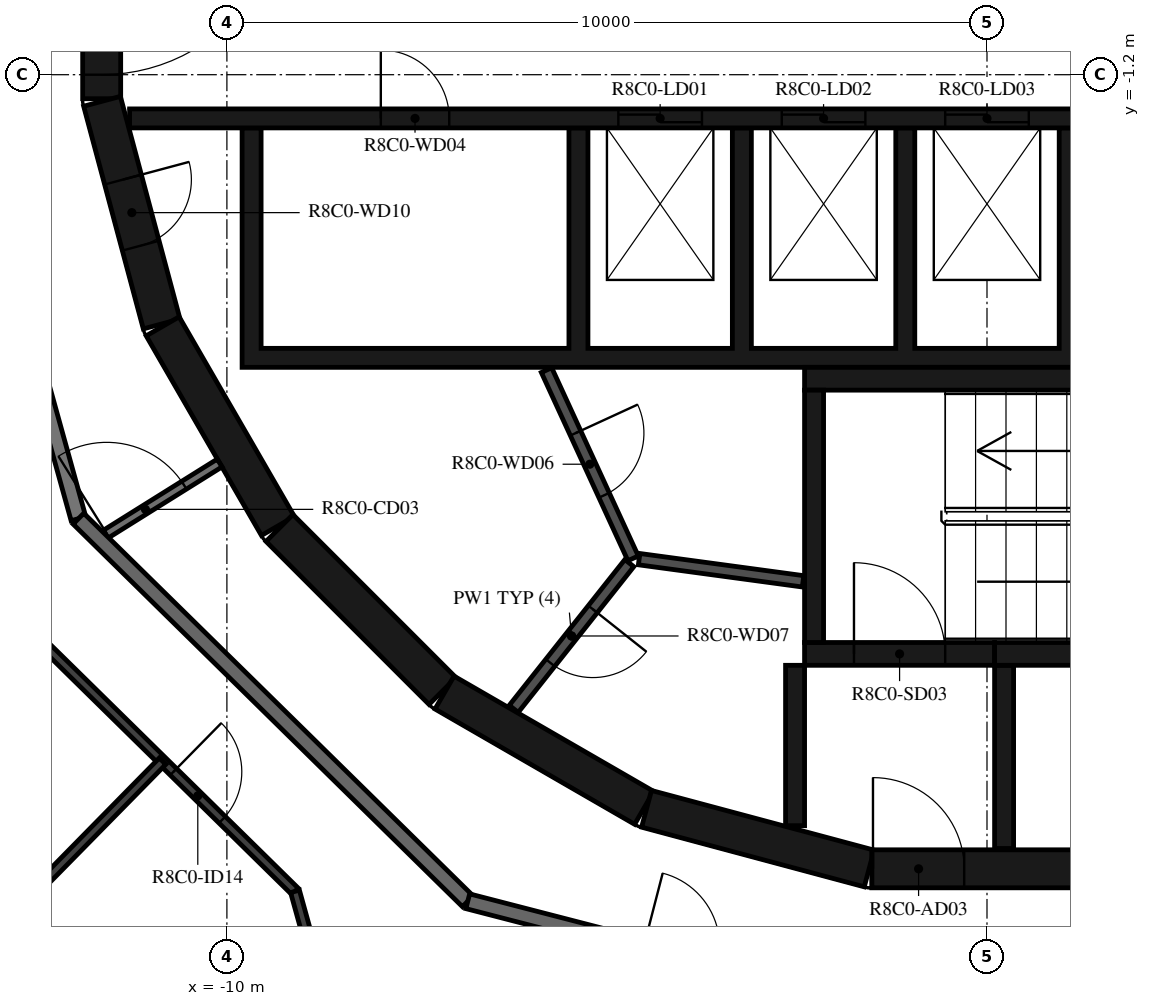
"""IFC4 building model, lengths in metres.
Left out: names, types, materials, properties, quantities, classifications, styles, units other than length and angle.
Written with IfcOpenShell. Run it as: python <this file> out.ifc"""

import sys

from ifc_helpers import new_model, si_unit, direction, frame, frame_2d, origin, place, context, subcontext, project, spatial, polyline, rectangle, outline, extrude, element, fill, save


model = new_model("IFC4")
c1 = context("Model", 3, precision=1e-05, world=origin(), true_north=direction((0.0, 1.0)))
c2 = subcontext(c1, "Body", "Model", "MODEL_VIEW")
j1 = project(units=[si_unit("LENGTHUNIT", "METRE"), si_unit("PLANEANGLEUNIT", "RADIAN")], contexts=[c1])
p1 = place(None, origin())
s1 = spatial("IfcSite", under=j1, at=p1, CompositionType="ELEMENT")
p2 = place(p1, origin())
s2 = spatial("IfcBuilding", under=s1, at=p2, CompositionType="ELEMENT")
p3 = place(p2, frame((0.0, 0.0, 319.2)))
s3 = spatial("IfcBuildingStorey", under=s2, at=p3, CompositionType="ELEMENT", Elevation=319.2)
p4 = place(p3, frame((-11.647, 1.516, 0.0), z_axis=(0.0, 0.0, 1.0), x_axis=(0.0, -1.0, 0.0)))
e1 = element("IfcWall", 1, at=p4, inside=s3, PredefinedType="SHEAR", context=c2, shape_type="SweptSolid", body=[
    extrude(rectangle(XDim=3.033, YDim=0.5, at=frame_2d((1.516, 0.0))), origin(), (0.0, 0.0, 1.0), 3.12),
])
p5 = place(p4, frame((0.316, 0.0, 0.0)))
e2 = element("IfcOpeningElement", 2, at=p5, cuts=e1, PredefinedType="OPENING", context=c2, shape_type="SweptSolid", body=[
    extrude(rectangle(XDim=2.4, YDim=2.1, at=frame_2d((1.2, 1.05))), frame((0.0, 0.26, 0.0), z_axis=(0.0, -1.0, 0.0), x_axis=(1.0, 0.0, 0.0)), (0.0, 0.0, 1.0), 0.52),
])
p6 = place(p3, frame((-11.643, -1.55, 0.0), z_axis=(0.0, 0.0, 1.0), x_axis=(0.258734743916, -0.965948410781, 0.0)))
e3 = element("IfcWall", 3, at=p6, inside=s3, PredefinedType="SHEAR", context=c2, shape_type="SweptSolid", body=[
    extrude(rectangle(XDim=3.033, YDim=0.5, at=frame_2d((1.516, 0.0))), origin(), (0.0, 0.0, 1.0), 3.12),
])
p7 = place(p6, frame((1.066, 0.0, 0.0)))
e4 = element("IfcOpeningElement", 4, at=p7, cuts=e3, PredefinedType="OPENING", context=c2, shape_type="SweptSolid", body=[
    extrude(rectangle(XDim=0.9, YDim=2.1, at=frame_2d((0.45, 1.05))), frame((0.0, 0.26, 0.0), z_axis=(0.0, -1.0, 0.0), x_axis=(1.0, 0.0, 0.0)), (0.0, 0.0, 1.0), 0.52),
])
p8 = place(p3, frame((-10.845, -4.51, 0.0), z_axis=(0.0, 0.0, 1.0), x_axis=(0.500087131594, -0.865975092491, 0.0)))
e5 = element("IfcWall", 5, at=p8, inside=s3, PredefinedType="SHEAR", context=c2, shape_type="SweptSolid", body=[
    extrude(rectangle(XDim=3.033, YDim=0.5, at=frame_2d((1.516, 0.0))), origin(), (0.0, 0.0, 1.0), 3.12),
])
p9 = place(p3, frame((-9.308, -7.164, 0.0), z_axis=(0.0, 0.0, 1.0), x_axis=(0.707106781187, -0.707106781187, 0.0)))
e6 = element("IfcWall", 6, at=p9, inside=s3, PredefinedType="SHEAR", context=c2, shape_type="SweptSolid", body=[
    extrude(rectangle(XDim=3.032, YDim=0.5, at=frame_2d((1.516, 0.0))), origin(), (0.0, 0.0, 1.0), 3.12),
])
for number, where, z_axis, x_axis in (
    (7, (-7.137, -9.329, 0.0), (0.0, 0.0, 1.0), (0.866, -0.5, 0.0)),
    (8, (-4.479, -10.858, 0.0), (0.0, 0.0, 1.0), (0.966, -0.259, 0.0)),
):
    element("IfcWall", number, at=place(p3, frame(where, z_axis=z_axis, x_axis=x_axis)), inside=s3, PredefinedType="SHEAR", context=c2, shape_type="SweptSolid", body=[
        extrude(rectangle(XDim=3.033, YDim=0.5, at=frame_2d((1.516, 0.0))), origin(), (0.0, 0.0, 1.0), 3.12),
    ])
p10 = place(p3, frame((-1.516, -11.647, 0.0), z_axis=(0.0, 0.0, 1.0), x_axis=(1.0, 0.0, 0.0)))
e9 = element("IfcWall", 9, at=p10, inside=s3, PredefinedType="SHEAR", context=c2, shape_type="SweptSolid", body=[
    extrude(rectangle(XDim=3.033, YDim=0.5, at=frame_2d((1.516, 0.0))), origin(), (0.0, 0.0, 1.0), 3.12),
])
p11 = place(p10, frame((0.016, 0.0, 0.0)))
e10 = element("IfcOpeningElement", 10, at=p11, cuts=e9, PredefinedType="OPENING", context=c2, shape_type="SweptSolid", body=[
    extrude(rectangle(XDim=1.2, YDim=2.1, at=frame_2d((0.6, 1.05))), frame((0.0, 0.26, 0.0), z_axis=(0.0, -1.0, 0.0), x_axis=(1.0, 0.0, 0.0)), (0.0, 0.0, 1.0), 0.52),
])
p12 = place(p3, frame((-2.275, -8.67, 0.0), z_axis=(0.0, 0.0, 1.0), x_axis=(0.0, 1.0, 0.0)))
e11 = element("IfcWall", 11, at=p12, inside=s3, PredefinedType="SHEAR", context=c2, shape_type="SweptSolid", body=[
    extrude(rectangle(XDim=3.32, YDim=0.25, at=frame_2d((1.66, 0.0))), origin(), (0.0, 0.0, 1.0), 3.12),
])
p13 = place(p3, frame((-2.4, -5.2, 0.0), z_axis=(0.0, 0.0, 1.0), x_axis=(1.0, 0.0, 0.0)))
e12 = element("IfcWall", 12, at=p13, inside=s3, PredefinedType="SHEAR", context=c2, shape_type="SweptSolid", body=[
    extrude(rectangle(XDim=7.05, YDim=0.3, at=frame_2d((3.525, 0.0))), origin(), (0.0, 0.0, 1.0), 3.12),
])
p14 = place(p3, frame((0.1, -8.82, 0.0), z_axis=(0.0, 0.0, 1.0), x_axis=(1.0, 0.0, 0.0)))
e13 = element("IfcWall", 13, at=p14, inside=s3, PredefinedType="SHEAR", context=c2, shape_type="SweptSolid", body=[
    extrude(rectangle(XDim=4.55, YDim=0.3, at=frame_2d((2.275, 0.0))), origin(), (0.0, 0.0, 1.0), 3.12),
])
p15 = place(p3, frame((-2.4, -8.82, 0.0), z_axis=(0.0, 0.0, 1.0), x_axis=(1.0, 0.0, 0.0)))
e14 = element("IfcWall", 14, at=p15, inside=s3, PredefinedType="SHEAR", context=c2, shape_type="SweptSolid", body=[
    extrude(rectangle(XDim=2.5, YDim=0.3, at=frame_2d((1.25, 0.0))), origin(), (0.0, 0.0, 1.0), 3.12),
])
p16 = place(p15, frame((0.65, 0.0, 0.0)))
e15 = element("IfcOpeningElement", 15, at=p16, cuts=e14, PredefinedType="OPENING", context=c2, shape_type="SweptSolid", body=[
    extrude(rectangle(XDim=1.2, YDim=2.1, at=frame_2d((0.6, 1.05))), frame((0.0, 0.16, 0.0), z_axis=(0.0, -1.0, 0.0), x_axis=(1.0, 0.0, 0.0)), (0.0, 0.0, 1.0), 0.32),
])
p17 = place(p3, frame((-2.525, -8.97, 0.0), z_axis=(0.0, 0.0, 1.0), x_axis=(0.0, -1.0, 0.0)))
e16 = element("IfcWall", 16, at=p17, inside=s3, PredefinedType="SHEAR", context=c2, shape_type="SweptSolid", body=[
    extrude(rectangle(XDim=2.11, YDim=0.25, at=frame_2d((1.055, 0.0))), origin(), (0.0, 0.0, 1.0), 3.12),
])
p18 = place(p3, frame((0.225, -8.97, 0.0), z_axis=(0.0, 0.0, 1.0), x_axis=(0.0, -1.0, 0.0)))
e17 = element("IfcWall", 17, at=p18, inside=s3, PredefinedType="SHEAR", context=c2, shape_type="SweptSolid", body=[
    extrude(rectangle(XDim=2.41, YDim=0.25, at=frame_2d((1.205, 0.0))), origin(), (0.0, 0.0, 1.0), 3.12),
])
p19 = place(p3, origin())
e18 = element("IfcWall", 18, at=p19, inside=s3, PredefinedType="SHEAR", context=c2, shape_type="SweptSolid", body=[
    extrude(outline(polyline([(9.8, -5.05), (9.8, -4.8), (9.8, -1.9), (9.55, -1.9), (9.55, -4.8), (7.65, -4.8), (7.65, -1.9), (7.4, -1.9), (7.4, -4.8), (5.5, -4.8), (5.5, -1.9), (5.25, -1.9), (5.25, -4.8), (3.35, -4.8), (3.35, -1.9), (3.1, -1.9), (3.1, -4.8), (1.2, -4.8), (1.2, -1.9), (0.95, -1.9), (0.95, -4.8), (-0.95, -4.8), (-0.95, -1.9), (-1.2, -1.9), (-1.2, -4.8), (-3.1, -4.8), (-3.1, -1.9), (-3.35, -1.9), (-3.35, -4.8), (-5.25, -4.8), (-5.25, -1.9), (-5.5, -1.9), (-5.5, -4.8), (-9.55, -4.8), (-9.55, -1.9), (-9.8, -1.9), (-9.8, -4.8), (-9.8, -5.05), (9.8, -5.05)])), origin(), (0.0, 0.0, 1.0), 3.12),
])
p20 = place(p3, frame((-11.28, -1.775, 0.0), z_axis=(0.0, 0.0, 1.0), x_axis=(1.0, 0.0, 0.0)))
e19 = element("IfcWall", 19, at=p20, inside=s3, PredefinedType="SHEAR", context=c2, shape_type="SweptSolid", body=[
    extrude(rectangle(XDim=14.38, YDim=0.25, at=frame_2d((7.19, 0.0))), origin(), (0.0, 0.0, 1.0), 3.12),
])
p21 = place(p20, frame((6.43, 0.0, 0.0)))
e20 = element("IfcOpeningElement", 20, at=p21, cuts=e19, PredefinedType="OPENING", context=c2, shape_type="SweptSolid", body=[
    extrude(rectangle(XDim=1.1, YDim=2.1, at=frame_2d((0.55, 1.05))), frame((0.0, 0.135, 0.0), z_axis=(0.0, -1.0, 0.0), x_axis=(1.0, 0.0, 0.0)), (0.0, 0.0, 1.0), 0.27),
])
p22 = place(p20, frame((8.58, 0.0, 0.0)))
e21 = element("IfcOpeningElement", 21, at=p22, cuts=e19, PredefinedType="OPENING", context=c2, shape_type="SweptSolid", body=[
    extrude(rectangle(XDim=1.1, YDim=2.1, at=frame_2d((0.55, 1.05))), frame((0.0, 0.135, 0.0), z_axis=(0.0, -1.0, 0.0), x_axis=(1.0, 0.0, 0.0)), (0.0, 0.0, 1.0), 0.27),
])
p23 = place(p20, frame((10.73, 0.0, 0.0)))
e22 = element("IfcOpeningElement", 22, at=p23, cuts=e19, PredefinedType="OPENING", context=c2, shape_type="SweptSolid", body=[
    extrude(rectangle(XDim=1.1, YDim=2.1, at=frame_2d((0.55, 1.05))), frame((0.0, 0.135, 0.0), z_axis=(0.0, -1.0, 0.0), x_axis=(1.0, 0.0, 0.0)), (0.0, 0.0, 1.0), 0.27),
])
p24 = place(p20, frame((3.305, 0.0, 0.0)))
e23 = element("IfcOpeningElement", 23, at=p24, cuts=e19, PredefinedType="OPENING", context=c2, shape_type="SweptSolid", body=[
    extrude(rectangle(XDim=0.9, YDim=2.1, at=frame_2d((0.45, 1.05))), frame((0.0, 0.135, 0.0), z_axis=(0.0, -1.0, 0.0), x_axis=(1.0, 0.0, 0.0)), (0.0, 0.0, 1.0), 0.27),
])
p25 = place(p20, frame((12.98, 0.0, 0.0)))
e24 = element("IfcOpeningElement", 24, at=p25, cuts=e19, PredefinedType="OPENING", context=c2, shape_type="SweptSolid", body=[
    extrude(rectangle(XDim=0.9, YDim=2.1, at=frame_2d((0.45, 1.05))), frame((0.0, 0.135, 0.0), z_axis=(0.0, -1.0, 0.0), x_axis=(1.0, 0.0, 0.0)), (0.0, 0.0, 1.0), 0.27),
])
p26 = place(p3, frame((-5.795, -5.086, 0.0), z_axis=(0.0, 0.0, 1.0), x_axis=(0.417887867606, -0.908498613157, 0.0)))
e25 = element("IfcWall", 25, at=p26, inside=s3, PredefinedType="PARTITIONING", context=c2, shape_type="SweptSolid", body=[
    extrude(rectangle(XDim=2.726, YDim=0.15, at=frame_2d((1.363, 0.0))), origin(), (0.0, 0.0, 1.0), 3.12),
])
p27 = place(p26, frame((0.913, 0.0, 0.0)))
e26 = element("IfcOpeningElement", 26, at=p27, cuts=e25, PredefinedType="OPENING", context=c2, shape_type="SweptSolid", body=[
    extrude(rectangle(XDim=0.9, YDim=2.1, at=frame_2d((0.45, 1.05))), frame((0.0, 0.085, 0.0), z_axis=(0.0, -1.0, 0.0), x_axis=(1.0, 0.0, 0.0)), (0.0, 0.0, 1.0), 0.17),
])
p28 = place(p3, frame((-4.706, -7.625, 0.0), z_axis=(0.0, 0.0, 1.0), x_axis=(-0.621392599334, -0.783499353856, 0.0)))
e27 = element("IfcWall", 27, at=p28, inside=s3, PredefinedType="PARTITIONING", context=c2, shape_type="SweptSolid", body=[
    extrude(rectangle(XDim=2.447, YDim=0.15, at=frame_2d((1.224, 0.0))), origin(), (0.0, 0.0, 1.0), 3.12),
])
p29 = place(p28, frame((0.774, 0.0, 0.0)))
e28 = element("IfcOpeningElement", 28, at=p29, cuts=e27, PredefinedType="OPENING", context=c2, shape_type="SweptSolid", body=[
    extrude(rectangle(XDim=0.9, YDim=2.1, at=frame_2d((0.45, 1.05))), frame((0.0, 0.085, 0.0), z_axis=(0.0, -1.0, 0.0), x_axis=(1.0, 0.0, 0.0)), (0.0, 0.0, 1.0), 0.17),
])
p30 = place(p3, frame((-2.42, -7.865, 0.0), z_axis=(0.0, 0.0, 1.0), x_axis=(-0.990972299108, 0.134066783362, 0.0)))
e29 = element("IfcWall", 29, at=p30, inside=s3, PredefinedType="PARTITIONING", context=c2, shape_type="SweptSolid", body=[
    extrude(rectangle(XDim=2.176, YDim=0.15, at=frame_2d((1.088, 0.0))), origin(), (0.0, 0.0, 1.0), 3.12),
])
p31 = place(p3, frame((-11.687, -7.303, 0.0), z_axis=(0.0, 0.0, 1.0), x_axis=(0.848064094072, 0.529893661357, 0.0)))
e30 = element("IfcWall", 30, at=p31, inside=s3, PredefinedType="PARTITIONING", context=c2, shape_type="SweptSolid", body=[
    extrude(rectangle(XDim=1.876, YDim=0.12, at=frame_2d((0.938, 0.0))), origin(), (0.0, 0.0, 1.0), 3.12),
])
p32 = place(p31, frame((0.125, 0.0, 0.0)))
e31 = element("IfcOpeningElement", 31, at=p32, cuts=e30, PredefinedType="OPENING", context=c2, shape_type="SweptSolid", body=[
    extrude(rectangle(XDim=1.2, YDim=2.1, at=frame_2d((0.6, 1.05))), frame((0.0, 0.07, 0.0), z_axis=(0.0, -1.0, 0.0), x_axis=(1.0, 0.0, 0.0)), (0.0, 0.0, 1.0), 0.14),
])
p33 = place(p3, frame((-13.872, -0.121, 0.0), z_axis=(0.0, 0.0, 1.0), x_axis=(0.267254575108, -0.963625960674, 0.0)))
e32 = element("IfcWall", 32, at=p33, inside=s3, PredefinedType="STANDARD", context=c2, shape_type="SweptSolid", body=[
    extrude(rectangle(XDim=7.181, YDim=0.2, at=frame_2d((3.591, 0.0))), origin(), (0.0, 0.0, 1.0), 3.12),
])
p34 = place(p3, frame((-11.953, -7.041, 0.0), z_axis=(0.0, 0.0, 1.0), x_axis=(0.713250549143, -0.70090916255, 0.0)))
e33 = element("IfcWall", 33, at=p34, inside=s3, PredefinedType="STANDARD", context=c2, shape_type="SweptSolid", body=[
    extrude(rectangle(XDim=7.181, YDim=0.2, at=frame_2d((3.59, 0.0))), origin(), (0.0, 0.0, 1.0), 3.12),
])
p35 = place(p3, frame((-6.831, -12.074, 0.0), z_axis=(0.0, 0.0, 1.0), x_axis=(0.968144780225, -0.250391063186, 0.0)))
e34 = element("IfcWall", 34, at=p35, inside=s3, PredefinedType="STANDARD", context=c2, shape_type="SweptSolid", body=[
    extrude(rectangle(XDim=7.181, YDim=0.2, at=frame_2d((3.591, 0.0))), origin(), (0.0, 0.0, 1.0), 3.12),
])
p36 = place(p35, frame((2.39, 0.0, 0.0)))
e35 = element("IfcOpeningElement", 35, at=p36, cuts=e34, PredefinedType="OPENING", context=c2, shape_type="SweptSolid", body=[
    extrude(rectangle(XDim=1.0, YDim=2.1, at=frame_2d((0.5, 1.05))), frame((0.0, 0.11, 0.0), z_axis=(0.0, -1.0, 0.0), x_axis=(1.0, 0.0, 0.0)), (0.0, 0.0, 1.0), 0.22),
])
p37 = place(p35, frame((5.69, 0.0, 0.0)))
e36 = element("IfcOpeningElement", 36, at=p37, cuts=e34, PredefinedType="OPENING", context=c2, shape_type="SweptSolid", body=[
    extrude(rectangle(XDim=1.0, YDim=2.1, at=frame_2d((0.5, 1.05))), frame((0.0, 0.11, 0.0), z_axis=(0.0, -1.0, 0.0), x_axis=(1.0, 0.0, 0.0)), (0.0, 0.0, 1.0), 0.22),
])
p38 = place(p3, frame((0.121, -13.872, 0.0), z_axis=(0.0, 0.0, 1.0), x_axis=(0.963625960674, 0.267254575108, 0.0)))
e37 = element("IfcWall", 37, at=p38, inside=s3, PredefinedType="STANDARD", context=c2, shape_type="SweptSolid", body=[
    extrude(rectangle(XDim=7.181, YDim=0.2, at=frame_2d((3.591, 0.0))), origin(), (0.0, 0.0, 1.0), 3.12),
])
p39 = place(p3, frame((-13.291, -7.829, 0.0), z_axis=(0.0, 0.0, 1.0), x_axis=(0.713255094589, -0.700904537039, 0.0)))
e38 = element("IfcWall", 38, at=p39, inside=s3, PredefinedType="PARTITIONING", context=c2, shape_type="SweptSolid", body=[
    extrude(rectangle(XDim=5.871, YDim=0.12, at=frame_2d((2.936, 0.0))), origin(), (0.0, 0.0, 1.0), 3.12),
])
p40 = place(p39, frame((3.627, 0.0, 0.0)))
e39 = element("IfcOpeningElement", 39, at=p40, cuts=e38, PredefinedType="OPENING", context=c2, shape_type="SweptSolid", body=[
    extrude(rectangle(XDim=0.9, YDim=2.1, at=frame_2d((0.45, 1.05))), frame((0.0, 0.07, 0.0), z_axis=(0.0, -1.0, 0.0), x_axis=(1.0, 0.0, 0.0)), (0.0, 0.0, 1.0), 0.14),
])
p41 = place(p3, frame((-9.104, -11.944, 0.0), z_axis=(0.0, 0.0, 1.0), x_axis=(0.267317596771, -0.963608479859, 0.0)))
e40 = element("IfcWall", 40, at=p41, inside=s3, PredefinedType="PARTITIONING", context=c2, shape_type="SweptSolid", body=[
    extrude(rectangle(XDim=1.042, YDim=0.12, at=frame_2d((0.521, 0.0))), origin(), (0.0, 0.0, 1.0), 3.12),
])
p42 = place(p3, frame((-14.066, -13.508, 0.0), z_axis=(0.0, 0.0, 1.0), x_axis=(0.700941781432, 0.7132184932, 0.0)))
e41 = element("IfcWall", 41, at=p42, inside=s3, PredefinedType="PARTITIONING", context=c2, shape_type="SweptSolid", body=[
    extrude(rectangle(XDim=4.594, YDim=0.12, at=frame_2d((2.297, 0.0))), origin(), (0.0, 0.0, 1.0), 3.12),
])
p43 = place(p16, origin())
e42 = element("IfcDoor", 42, at=p43, inside=s3, OperationType="SINGLE_SWING_LEFT", PredefinedType="DOOR", context=c2, shape_type="SweptSolid", body=[
    extrude(rectangle(XDim=1.2, YDim=2.1, at=frame_2d((0.6, 1.05))), frame((0.0, 0.025, 0.0), z_axis=(0.0, -1.0, 0.0), x_axis=(1.0, 0.0, 0.0)), (0.0, 0.0, 1.0), 0.05),
])
fill(e15, e42)
p44 = place(p11, origin())
e43 = element("IfcDoor", 43, at=p44, inside=s3, OperationType="SINGLE_SWING_RIGHT", PredefinedType="DOOR", context=c2, shape_type="SweptSolid", body=[
    extrude(rectangle(XDim=1.2, YDim=2.1, at=frame_2d((0.6, 1.05))), frame((0.0, 0.025, 0.0), z_axis=(0.0, -1.0, 0.0), x_axis=(1.0, 0.0, 0.0)), (0.0, 0.0, 1.0), 0.05),
])
fill(e10, e43)
p45 = place(p5, origin())
e44 = element("IfcDoor", 44, at=p45, inside=s3, OperationType="DOUBLE_DOOR_SINGLE_SWING", PredefinedType="DOOR", context=c2, shape_type="SweptSolid", body=[
    extrude(rectangle(XDim=2.4, YDim=2.1, at=frame_2d((1.2, 1.05))), frame((0.0, 0.025, 0.0), z_axis=(0.0, -1.0, 0.0), x_axis=(1.0, 0.0, 0.0)), (0.0, 0.0, 1.0), 0.05),
])
fill(e2, e44)
p46 = place(p21, origin())
e45 = element("IfcDoor", 45, at=p46, inside=s3, OperationType="DOUBLE_DOOR_SLIDING", PredefinedType="DOOR", context=c2, shape_type="SweptSolid", body=[
    extrude(rectangle(XDim=1.1, YDim=2.1, at=frame_2d((0.55, 1.05))), frame((0.0, 0.025, 0.0), z_axis=(0.0, -1.0, 0.0), x_axis=(1.0, 0.0, 0.0)), (0.0, 0.0, 1.0), 0.05),
])
fill(e20, e45)
p47 = place(p22, origin())
e46 = element("IfcDoor", 46, at=p47, inside=s3, OperationType="DOUBLE_DOOR_SLIDING", PredefinedType="DOOR", context=c2, shape_type="SweptSolid", body=[
    extrude(rectangle(XDim=1.1, YDim=2.1, at=frame_2d((0.55, 1.05))), frame((0.0, 0.025, 0.0), z_axis=(0.0, -1.0, 0.0), x_axis=(1.0, 0.0, 0.0)), (0.0, 0.0, 1.0), 0.05),
])
fill(e21, e46)
p48 = place(p23, origin())
e47 = element("IfcDoor", 47, at=p48, inside=s3, OperationType="DOUBLE_DOOR_SLIDING", PredefinedType="DOOR", context=c2, shape_type="SweptSolid", body=[
    extrude(rectangle(XDim=1.1, YDim=2.1, at=frame_2d((0.55, 1.05))), frame((0.0, 0.025, 0.0), z_axis=(0.0, -1.0, 0.0), x_axis=(1.0, 0.0, 0.0)), (0.0, 0.0, 1.0), 0.05),
])
fill(e22, e47)
p49 = place(p24, origin())
e48 = element("IfcDoor", 48, at=p49, inside=s3, OperationType="SINGLE_SWING_RIGHT", PredefinedType="DOOR", context=c2, shape_type="SweptSolid", body=[
    extrude(rectangle(XDim=0.9, YDim=2.1, at=frame_2d((0.45, 1.05))), frame((0.0, 0.025, 0.0), z_axis=(0.0, -1.0, 0.0), x_axis=(1.0, 0.0, 0.0)), (0.0, 0.0, 1.0), 0.05),
])
fill(e23, e48)
p50 = place(p27, origin())
e49 = element("IfcDoor", 49, at=p50, inside=s3, OperationType="SINGLE_SWING_RIGHT", PredefinedType="DOOR", context=c2, shape_type="SweptSolid", body=[
    extrude(rectangle(XDim=0.9, YDim=2.1, at=frame_2d((0.45, 1.05))), frame((0.0, 0.025, 0.0), z_axis=(0.0, -1.0, 0.0), x_axis=(1.0, 0.0, 0.0)), (0.0, 0.0, 1.0), 0.05),
])
fill(e26, e49)
p51 = place(p29, origin())
e50 = element("IfcDoor", 50, at=p51, inside=s3, OperationType="SINGLE_SWING_LEFT", PredefinedType="DOOR", context=c2, shape_type="SweptSolid", body=[
    extrude(rectangle(XDim=0.9, YDim=2.1, at=frame_2d((0.45, 1.05))), frame((0.0, 0.025, 0.0), z_axis=(0.0, -1.0, 0.0), x_axis=(1.0, 0.0, 0.0)), (0.0, 0.0, 1.0), 0.05),
])
fill(e28, e50)
p52 = place(p7, origin())
e51 = element("IfcDoor", 51, at=p52, inside=s3, OperationType="SINGLE_SWING_RIGHT", PredefinedType="DOOR", context=c2, shape_type="SweptSolid", body=[
    extrude(rectangle(XDim=0.9, YDim=2.1, at=frame_2d((0.45, 1.05))), frame((0.0, 0.025, 0.0), z_axis=(0.0, -1.0, 0.0), x_axis=(1.0, 0.0, 0.0)), (0.0, 0.0, 1.0), 0.05),
])
fill(e4, e51)
p53 = place(p40, origin())
e52 = element("IfcDoor", 52, at=p53, inside=s3, OperationType="SINGLE_SWING_RIGHT", PredefinedType="DOOR", context=c2, shape_type="SweptSolid", body=[
    extrude(rectangle(XDim=0.9, YDim=2.1, at=frame_2d((0.45, 1.05))), frame((0.0, 0.025, 0.0), z_axis=(0.0, -1.0, 0.0), x_axis=(1.0, 0.0, 0.0)), (0.0, 0.0, 1.0), 0.05),
])
fill(e39, e52)
p54 = place(p32, origin())
e53 = element("IfcDoor", 53, at=p54, inside=s3, OperationType="DOUBLE_DOOR_SINGLE_SWING", PredefinedType="DOOR", context=c2, shape_type="SweptSolid", body=[
    extrude(rectangle(XDim=1.2, YDim=2.1, at=frame_2d((0.6, 1.05))), frame((0.0, 0.025, 0.0), z_axis=(0.0, -1.0, 0.0), x_axis=(1.0, 0.0, 0.0)), (0.0, 0.0, 1.0), 0.05),
])
fill(e31, e53)
save(model, sys.argv[1])
